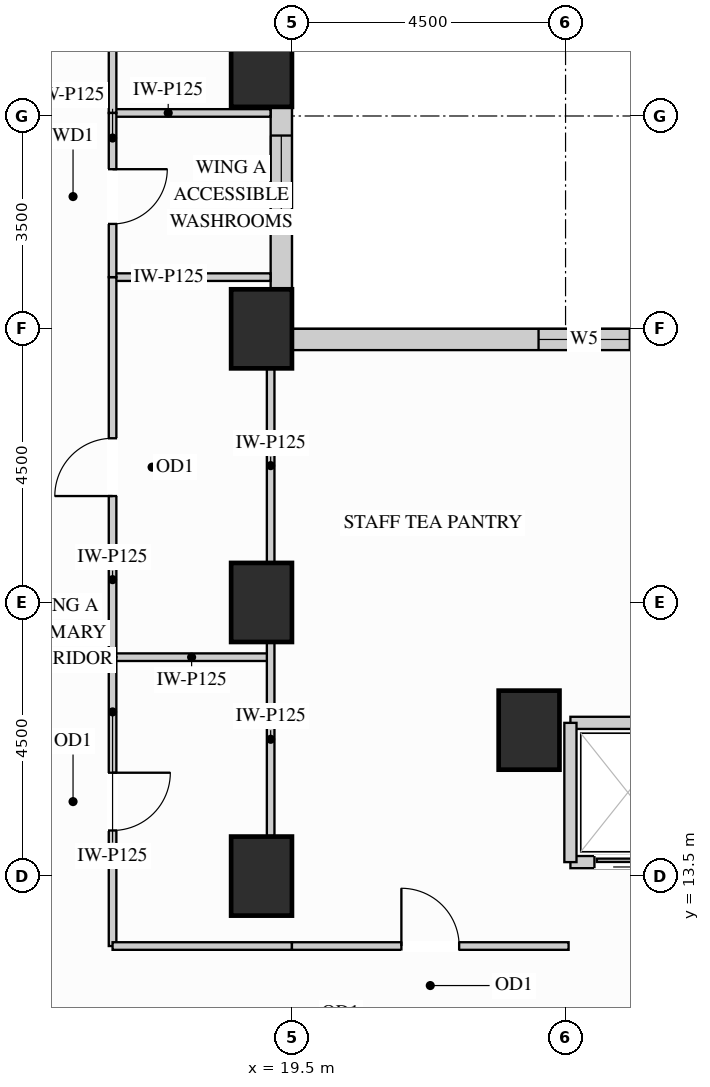
"""IFC4 building model, lengths in metres.
Left out: names, types, materials, properties, quantities, classifications, styles, units other than length and angle.
Written with IfcOpenShell. Run it as: python <this file> out.ifc"""

import sys

from ifc_helpers import new_model, si_unit, direction, frame, frame_2d, origin, origin_2d, place, context, subcontext, project, spatial, rectangle, extrude, source, transform, mapped, element, fill, save


model = new_model("IFC4")
c1 = context("Model", 3, precision=1e-05, world=origin(), true_north=direction((0.0, 1.0)))
c2 = subcontext(c1, "Body", "Model", "MODEL_VIEW")
j1 = project(units=[si_unit("LENGTHUNIT", "METRE"), si_unit("PLANEANGLEUNIT", "RADIAN")], contexts=[c1])
p1 = place(None, origin())
s1 = spatial("IfcSite", under=j1, at=p1, CompositionType="ELEMENT")
p2 = place(p1, origin())
s2 = spatial("IfcBuilding", under=s1, at=p2, CompositionType="ELEMENT")
p3 = place(p2, frame((0.0, 0.0, 58.5)))
s3 = spatial("IfcBuildingStorey", under=s2, at=p3, CompositionType="ELEMENT", Elevation=58.5)
m1 = source(origin(), c2, "Body", "SweptSolid", [
    extrude(rectangle(XDim=1.0, YDim=1.3, at=origin_2d()), origin(), (0.0, 0.0, 1.0), 3.38),
])
for number, where, z_axis, x_axis in (
    (1, (19.0, 13.5, 0.0), (0.0, 0.0, 1.0), (1.0, 0.0, 0.0)),
    (2, (19.0, 18.0, 0.0), (0.0, 0.0, 1.0), (1.0, 0.0, 0.0)),
    (3, (19.0, 22.5, 0.0), (0.0, 0.0, 1.0), (1.0, 0.0, 0.0)),
    (4, (19.0, 26.8, 0.0), (0.0, 0.0, 1.0), (1.0, 0.0, 0.0)),
    (5, (23.4, 15.9, 0.0), (0.0, 0.0, 1.0), (1.0, 0.0, 0.0)),
):
    element("IfcColumn", number, at=place(p3, frame(where, z_axis=z_axis, x_axis=x_axis)), inside=s3, PredefinedType="COLUMN", context=c2, shape_type="MappedRepresentation", body=[
        mapped(m1, transform((0.0, 0.0, 0.0), x_axis=(1.0, 0.0, 0.0), y_axis=(0.0, 1.0, 0.0), z_axis=(0.0, 0.0, 1.0))),
    ])
p4 = place(p3, frame((34.352, 22.325, 0.0), z_axis=(0.0, 0.0, 1.0), x_axis=(-1.0, 0.0, 0.0)))
e6 = element("IfcWall", 6, at=p4, inside=s3, PredefinedType="SOLIDWALL", context=c2, shape_type="SweptSolid", body=[
    extrude(rectangle(XDim=14.854, YDim=0.35, at=frame_2d((7.427, 0.0))), origin(), (0.0, 0.0, 1.0), 3.365),
])
p5 = place(p4, frame((4.058, 0.0, 0.78)))
e7 = element("IfcOpeningElement", 7, at=p5, cuts=e6, PredefinedType="OPENING", context=c2, shape_type="SweptSolid", body=[
    extrude(rectangle(XDim=1.5, YDim=2.0, at=frame_2d((0.75, 1.0))), frame((0.0, 0.185, 0.0), z_axis=(0.0, -1.0, 0.0), x_axis=(1.0, 0.0, 0.0)), (0.0, 0.0, 1.0), 0.37),
])
p6 = place(p4, frame((9.296, 0.0, 0.78)))
e8 = element("IfcOpeningElement", 8, at=p6, cuts=e6, PredefinedType="OPENING", context=c2, shape_type="SweptSolid", body=[
    extrude(rectangle(XDim=1.5, YDim=2.0, at=frame_2d((0.75, 1.0))), frame((0.0, 0.185, 0.0), z_axis=(0.0, -1.0, 0.0), x_axis=(1.0, 0.0, 0.0)), (0.0, 0.0, 1.0), 0.37),
])
p7 = place(p3, frame((19.325, 23.148, 0.0), z_axis=(0.0, 0.0, 1.0), x_axis=(0.0, 1.0, 0.0)))
e9 = element("IfcWall", 9, at=p7, inside=s3, PredefinedType="SOLIDWALL", context=c2, shape_type="SweptSolid", body=[
    extrude(rectangle(XDim=3.004, YDim=0.35, at=frame_2d((1.502, 0.0))), origin(), (0.0, 0.0, 1.0), 2.51),
])
p8 = place(p7, frame((1.031, 0.0, 0.78)))
e10 = element("IfcOpeningElement", 10, at=p8, cuts=e9, PredefinedType="OPENING", context=c2, shape_type="SweptSolid", body=[
    extrude(rectangle(XDim=1.5, YDim=1.55, at=frame_2d((0.75, 0.775))), frame((0.0, 0.185, 0.0), z_axis=(0.0, -1.0, 0.0), x_axis=(1.0, 0.0, 0.0)), (0.0, 0.0, 1.0), 0.37),
])
m2 = source(origin(), c2, "Body", "SweptSolid", [
    extrude(rectangle(XDim=2.6, YDim=0.125, at=frame_2d((1.3, 0.0))), origin(), (0.0, 0.0, 1.0), 3.365),
])
p9 = place(p3, frame((16.55, 17.1, 0.0), z_axis=(0.0, 0.0, 1.0), x_axis=(1.0, 0.0, 0.0)))
e11 = element("IfcWall", 11, at=p9, inside=s3, PredefinedType="PARTITIONING", context=c2, shape_type="MappedRepresentation", body=[
    mapped(m2, transform((0.0, 0.0, 0.0), x_axis=(1.0, 0.0, 0.0), y_axis=(0.0, 1.0, 0.0), z_axis=(0.0, 0.0, 1.0))),
])
m3 = source(origin(), c2, "Body", "SweptSolid", [
    extrude(rectangle(XDim=2.598, YDim=0.125, at=frame_2d((1.299, 0.0))), origin(), (0.0, 0.0, 1.0), 3.365),
])
for number, where, z_axis, x_axis in (
    (12, (16.55, 23.35, 0.0), (0.0, 0.0, 1.0), (1.0, 0.0, 0.0)),
    (13, (16.55, 26.05, 0.0), (0.0, 0.0, 1.0), (1.0, 0.0, 0.0)),
):
    element("IfcWall", number, at=place(p3, frame(where, z_axis=z_axis, x_axis=x_axis)), inside=s3, PredefinedType="PARTITIONING", context=c2, shape_type="MappedRepresentation", body=[
        mapped(m3, transform((0.0, 0.0, 0.0), x_axis=(1.0, 0.0, 0.0), y_axis=(0.0, 1.0, 0.0), z_axis=(0.0, 0.0, 1.0))),
    ])
m4 = source(origin(), c2, "Body", "SweptSolid", [
    extrude(rectangle(XDim=3.18, YDim=0.125, at=frame_2d((1.59, 0.0))), origin(), (0.0, 0.0, 1.0), 2.67),
])
for number, where, z_axis, x_axis in (
    (14, (19.15, 14.16, 0.0), (0.0, 0.0, 1.0), (0.0, 1.0, 0.0)),
    (15, (19.15, 18.66, 0.0), (0.0, 0.0, 1.0), (0.0, 1.0, 0.0)),
):
    element("IfcWall", number, at=place(p3, frame(where, z_axis=z_axis, x_axis=x_axis)), inside=s3, PredefinedType="PARTITIONING", context=c2, shape_type="MappedRepresentation", body=[
        mapped(m4, transform((0.0, 0.0, 0.0), x_axis=(1.0, 0.0, 0.0), y_axis=(0.0, 1.0, 0.0), z_axis=(0.0, 0.0, 1.0))),
    ])
p10 = place(p3, frame((16.55, 12.35, 0.0), z_axis=(0.0, 0.0, 1.0), x_axis=(0.0, 1.0, 0.0)))
e16 = element("IfcWall", 16, at=p10, inside=s3, PredefinedType="PARTITIONING", context=c2, shape_type="SweptSolid", body=[
    extrude(rectangle(XDim=4.75, YDim=0.125, at=frame_2d((2.375, 0.0))), origin(), (0.0, 0.0, 1.0), 3.365),
])
p11 = place(p10, frame((1.9, 0.0, 0.0)))
e17 = element("IfcOpeningElement", 17, at=p11, cuts=e16, PredefinedType="OPENING", context=c2, shape_type="SweptSolid", body=[
    extrude(rectangle(XDim=0.95, YDim=2.15, at=frame_2d((0.475, 1.075))), frame((0.0, 0.073, 0.0), z_axis=(0.0, -1.0, 0.0), x_axis=(1.0, 0.0, 0.0)), (0.0, 0.0, 1.0), 0.145),
])
p12 = place(p3, frame((16.55, 17.1, 0.0), z_axis=(0.0, 0.0, 1.0), x_axis=(0.0, 1.0, 0.0)))
e18 = element("IfcWall", 18, at=p12, inside=s3, PredefinedType="PARTITIONING", context=c2, shape_type="SweptSolid", body=[
    extrude(rectangle(XDim=6.25, YDim=0.125, at=frame_2d((3.125, 0.0))), origin(), (0.0, 0.0, 1.0), 3.365),
])
p13 = place(p12, frame((2.65, 0.0, 0.0)))
e19 = element("IfcOpeningElement", 19, at=p13, cuts=e18, PredefinedType="OPENING", context=c2, shape_type="SweptSolid", body=[
    extrude(rectangle(XDim=0.95, YDim=2.15, at=frame_2d((0.475, 1.075))), frame((0.0, 0.073, 0.0), z_axis=(0.0, -1.0, 0.0), x_axis=(1.0, 0.0, 0.0)), (0.0, 0.0, 1.0), 0.145),
])
p14 = place(p3, frame((16.55, 26.05, 0.0), z_axis=(0.0, 0.0, 1.0), x_axis=(0.0, 1.0, 0.0)))
e20 = element("IfcWall", 20, at=p14, inside=s3, PredefinedType="PARTITIONING", context=c2, shape_type="SweptSolid", body=[
    extrude(rectangle(XDim=6.0, YDim=0.125, at=frame_2d((3.0, 0.0))), origin(), (0.0, 0.0, 1.0), 3.365),
])
p15 = place(p14, frame((2.525, 0.0, 0.0)))
e21 = element("IfcOpeningElement", 21, at=p15, cuts=e20, PredefinedType="OPENING", context=c2, shape_type="SweptSolid", body=[
    extrude(rectangle(XDim=0.95, YDim=2.15, at=frame_2d((0.475, 1.075))), frame((0.0, 0.073, 0.0), z_axis=(0.0, -1.0, 0.0), x_axis=(1.0, 0.0, 0.0)), (0.0, 0.0, 1.0), 0.145),
])
p16 = place(p3, frame((16.55, 23.35, 0.0), z_axis=(0.0, 0.0, 1.0), x_axis=(0.0, 1.0, 0.0)))
e22 = element("IfcWall", 22, at=p16, inside=s3, PredefinedType="PARTITIONING", context=c2, shape_type="SweptSolid", body=[
    extrude(rectangle(XDim=2.7, YDim=0.125, at=frame_2d((1.35, 0.0))), origin(), (0.0, 0.0, 1.0), 3.365),
])
p17 = place(p16, frame((0.875, 0.0, 0.0)))
e23 = element("IfcOpeningElement", 23, at=p17, cuts=e22, PredefinedType="OPENING", context=c2, shape_type="SweptSolid", body=[
    extrude(rectangle(XDim=0.9, YDim=2.15, at=frame_2d((0.45, 1.075))), frame((0.0, 0.073, 0.0), z_axis=(0.0, -1.0, 0.0), x_axis=(1.0, 0.0, 0.0)), (0.0, 0.0, 1.0), 0.145),
])
m5 = source(origin(), c2, "Body", "SweptSolid", [
    extrude(rectangle(XDim=2.95, YDim=0.125, at=frame_2d((1.475, 0.0))), origin(), (0.0, 0.0, 1.0), 3.365),
])
p18 = place(p3, frame((16.55, 12.35, 0.0), z_axis=(0.0, 0.0, 1.0), x_axis=(1.0, 0.0, 0.0)))
e24 = element("IfcWall", 24, at=p18, inside=s3, PredefinedType="PARTITIONING", context=c2, shape_type="MappedRepresentation", body=[
    mapped(m5, transform((0.0, 0.0, 0.0), x_axis=(1.0, 0.0, 0.0), y_axis=(0.0, 1.0, 0.0), z_axis=(0.0, 0.0, 1.0))),
])
p19 = place(p3, frame((19.5, 12.35, 0.0), z_axis=(0.0, 0.0, 1.0), x_axis=(1.0, 0.0, 0.0)))
e25 = element("IfcWall", 25, at=p19, inside=s3, PredefinedType="PARTITIONING", context=c2, shape_type="SweptSolid", body=[
    extrude(rectangle(XDim=4.55, YDim=0.125, at=frame_2d((2.275, 0.0))), origin(), (0.0, 0.0, 1.0), 3.365),
])
p20 = place(p19, frame((1.8, 0.0, 0.0)))
e26 = element("IfcOpeningElement", 26, at=p20, cuts=e25, PredefinedType="OPENING", context=c2, shape_type="SweptSolid", body=[
    extrude(rectangle(XDim=0.95, YDim=2.15, at=frame_2d((0.475, 1.075))), frame((0.0, 0.073, 0.0), z_axis=(0.0, -1.0, 0.0), x_axis=(1.0, 0.0, 0.0)), (0.0, 0.0, 1.0), 0.145),
])
m6 = source(origin(), c2, "Body", "SweptSolid", [
    extrude(rectangle(XDim=1.89, YDim=0.2, at=frame_2d((0.945, 0.0))), origin(), (0.0, 0.0, 1.0), 2.67),
])
p21 = place(p3, frame((24.08, 16.02, 0.0), z_axis=(0.0, 0.0, 1.0), x_axis=(1.0, 0.0, 0.0)))
e27 = element("IfcWall", 27, at=p21, inside=s3, PredefinedType="PARTITIONING", context=c2, shape_type="MappedRepresentation", body=[
    mapped(m6, transform((0.0, 0.0, 0.0), x_axis=(1.0, 0.0, 0.0), y_axis=(0.0, 1.0, 0.0), z_axis=(0.0, 0.0, 1.0))),
])
p22 = place(p3, frame((24.08, 13.73, 0.0), z_axis=(0.0, 0.0, 1.0), x_axis=(1.0, 0.0, 0.0)))
e28 = element("IfcWall", 28, at=p22, inside=s3, PredefinedType="PARTITIONING", context=c2, shape_type="SweptSolid", body=[
    extrude(rectangle(XDim=1.89, YDim=0.2, at=frame_2d((0.945, 0.0))), origin(), (0.0, 0.0, 1.0), 2.446),
])
p23 = place(p22, frame((0.395, 0.0, 0.0)))
e29 = element("IfcOpeningElement", 29, at=p23, cuts=e28, PredefinedType="OPENING", context=c2, shape_type="SweptSolid", body=[
    extrude(rectangle(XDim=1.1, YDim=2.2, at=frame_2d((0.55, 1.1))), frame((0.0, 0.11, 0.0), z_axis=(0.0, -1.0, 0.0), x_axis=(1.0, 0.0, 0.0)), (0.0, 0.0, 1.0), 0.22),
])
m7 = source(origin(), c2, "Body", "SweptSolid", [
    extrude(rectangle(XDim=2.29, YDim=0.2, at=frame_2d((1.145, 0.0))), origin(), (0.0, 0.0, 1.0), 3.365),
])
p24 = place(p3, frame((24.08, 13.73, 0.0), z_axis=(0.0, 0.0, 1.0), x_axis=(0.0, 1.0, 0.0)))
e30 = element("IfcWall", 30, at=p24, inside=s3, PredefinedType="PARTITIONING", context=c2, shape_type="MappedRepresentation", body=[
    mapped(m7, transform((0.0, 0.0, 0.0), x_axis=(1.0, 0.0, 0.0), y_axis=(0.0, 1.0, 0.0), z_axis=(0.0, 0.0, 1.0))),
])
m8 = source(origin(), c2, "Body", "SweptSolid", [
    extrude(rectangle(XDim=1.1, YDim=2.2, at=frame_2d((0.55, 1.1))), frame((0.0, 0.025, 0.0), z_axis=(0.0, -1.0, 0.0), x_axis=(1.0, 0.0, 0.0)), (0.0, 0.0, 1.0), 0.05),
])
p25 = place(p23, origin())
e31 = element("IfcDoor", 31, at=p25, inside=s3, OperationType="SLIDING_TO_LEFT", PredefinedType="DOOR", context=c2, shape_type="MappedRepresentation", body=[
    mapped(m8, transform((0.0, 0.0, 0.0), x_axis=(1.0, 0.0, 0.0), y_axis=(0.0, 1.0, 0.0), z_axis=(0.0, 0.0, 1.0))),
])
fill(e29, e31)
m9 = source(origin(), c2, "Body", "SweptSolid", [
    extrude(rectangle(XDim=0.95, YDim=2.15, at=frame_2d((0.475, 1.075))), frame((0.0, 0.025, 0.0), z_axis=(0.0, -1.0, 0.0), x_axis=(1.0, 0.0, 0.0)), (0.0, 0.0, 1.0), 0.05),
])
p26 = place(p11, origin())
e32 = element("IfcDoor", 32, at=p26, inside=s3, OperationType="SINGLE_SWING_RIGHT", PredefinedType="DOOR", context=c2, shape_type="MappedRepresentation", body=[
    mapped(m9, transform((0.0, 0.0, 0.0), x_axis=(1.0, 0.0, 0.0), y_axis=(0.0, 1.0, 0.0), z_axis=(0.0, 0.0, 1.0))),
])
fill(e17, e32)
p27 = place(p13, origin())
e33 = element("IfcDoor", 33, at=p27, inside=s3, OperationType="SINGLE_SWING_LEFT", PredefinedType="DOOR", context=c2, shape_type="MappedRepresentation", body=[
    mapped(m9, transform((0.0, 0.0, 0.0), x_axis=(1.0, 0.0, 0.0), y_axis=(0.0, 1.0, 0.0), z_axis=(0.0, 0.0, 1.0))),
])
fill(e19, e33)
p28 = place(p20, origin())
e34 = element("IfcDoor", 34, at=p28, inside=s3, OperationType="SINGLE_SWING_LEFT", PredefinedType="DOOR", context=c2, shape_type="MappedRepresentation", body=[
    mapped(m9, transform((0.0, 0.0, 0.0), x_axis=(1.0, 0.0, 0.0), y_axis=(0.0, 1.0, 0.0), z_axis=(0.0, 0.0, 1.0))),
])
fill(e26, e34)
m10 = source(origin(), c2, "Body", "SweptSolid", [
    extrude(rectangle(XDim=0.9, YDim=2.15, at=frame_2d((0.45, 1.075))), frame((0.0, 0.025, 0.0), z_axis=(0.0, -1.0, 0.0), x_axis=(1.0, 0.0, 0.0)), (0.0, 0.0, 1.0), 0.05),
])
p29 = place(p17, origin())
e35 = element("IfcDoor", 35, at=p29, inside=s3, OperationType="SINGLE_SWING_RIGHT", PredefinedType="DOOR", context=c2, shape_type="MappedRepresentation", body=[
    mapped(m10, transform((0.0, 0.0, 0.0), x_axis=(1.0, 0.0, 0.0), y_axis=(0.0, 1.0, 0.0), z_axis=(0.0, 0.0, 1.0))),
])
fill(e23, e35)
m11 = source(origin(), c2, "Body", "SweptSolid", [
    extrude(rectangle(XDim=1.5, YDim=2.0, at=frame_2d((0.75, 1.0))), frame((0.0, 0.03, 0.0), z_axis=(0.0, -1.0, 0.0), x_axis=(1.0, 0.0, 0.0)), (0.0, 0.0, 1.0), 0.06),
])
p30 = place(p6, origin())
e36 = element("IfcWindow", 36, at=p30, inside=s3, PartitioningType="SINGLE_PANEL", PredefinedType="WINDOW", context=c2, shape_type="MappedRepresentation", body=[
    mapped(m11, transform((0.0, 0.0, 0.0), x_axis=(1.0, 0.0, 0.0), y_axis=(0.0, 1.0, 0.0), z_axis=(0.0, 0.0, 1.0))),
])
fill(e8, e36)
m12 = source(origin(), c2, "Body", "SweptSolid", [
    extrude(rectangle(XDim=1.5, YDim=1.55, at=frame_2d((0.75, 0.775))), frame((0.0, 0.03, 0.0), z_axis=(0.0, -1.0, 0.0), x_axis=(1.0, 0.0, 0.0)), (0.0, 0.0, 1.0), 0.06),
])
p31 = place(p8, origin())
e37 = element("IfcWindow", 37, at=p31, inside=s3, PartitioningType="SINGLE_PANEL", PredefinedType="WINDOW", context=c2, shape_type="MappedRepresentation", body=[
    mapped(m12, transform((0.0, 0.0, 0.0), x_axis=(1.0, 0.0, 0.0), y_axis=(0.0, 1.0, 0.0), z_axis=(0.0, 0.0, 1.0))),
])
fill(e10, e37)
save(model, sys.argv[1])
